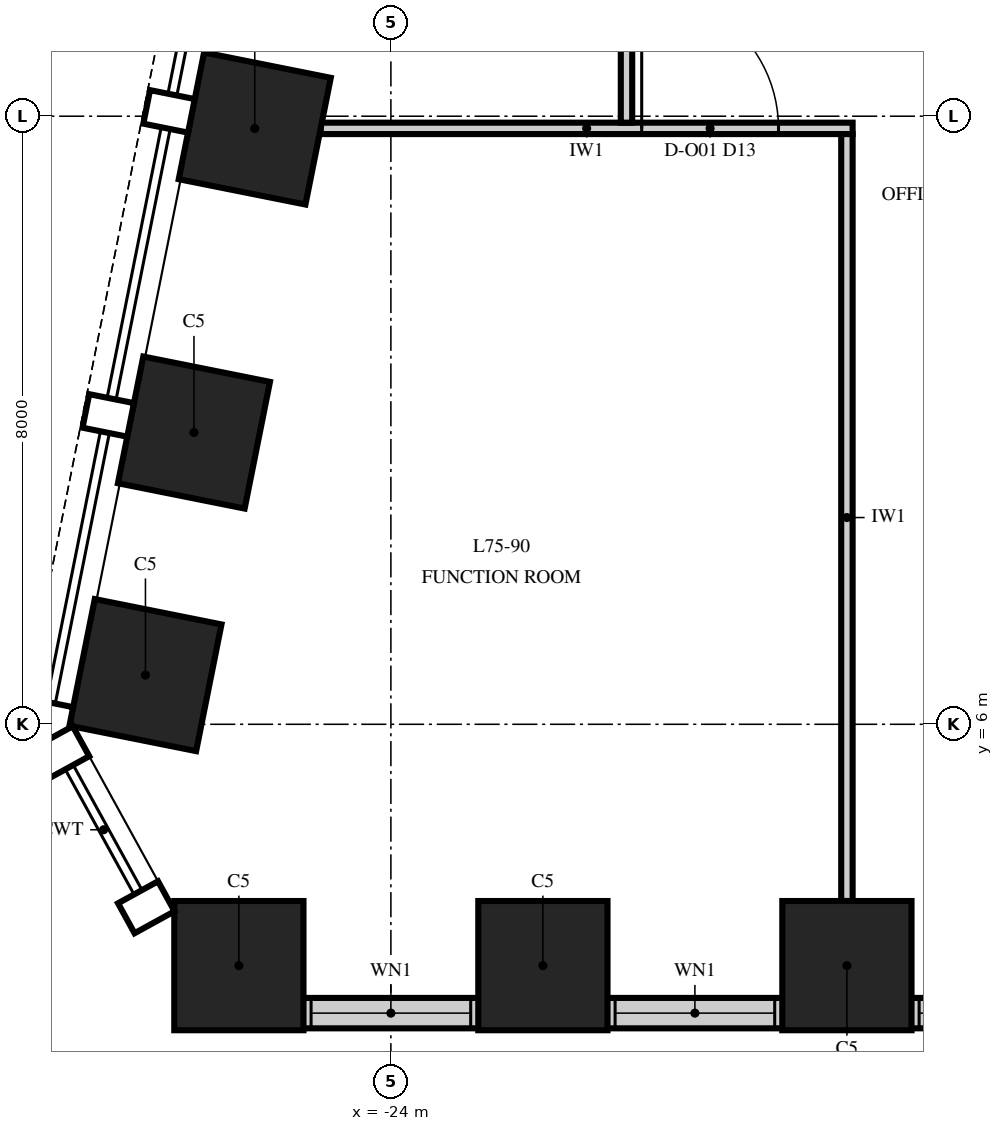
"""IFC4 building model, lengths in metres.
Left out: names, types, materials, properties, quantities, classifications, styles, units other than length and angle.
Written with IfcOpenShell. Run it as: python <this file> out.ifc"""

import sys

from ifc_helpers import new_model, si_unit, direction, frame, frame_2d, origin, origin_2d, place, context, subcontext, project, spatial, rectangle, extrude, element, fill, save


model = new_model("IFC4")
c1 = context("Model", 3, precision=1e-05, world=origin(), true_north=direction((0.0, 1.0)))
c2 = subcontext(c1, "Body", "Model", "MODEL_VIEW")
j1 = project(units=[si_unit("LENGTHUNIT", "METRE"), si_unit("PLANEANGLEUNIT", "RADIAN")], contexts=[c1])
p1 = place(None, origin())
s1 = spatial("IfcSite", under=j1, at=p1, CompositionType="ELEMENT")
p2 = place(p1, origin())
s2 = spatial("IfcBuilding", under=s1, at=p2, CompositionType="ELEMENT")
p3 = place(p2, frame((0.0, 0.0, 320.0)))
s3 = spatial("IfcBuildingStorey", under=s2, at=p3, CompositionType="ELEMENT", Elevation=320.0)
for number, where, z_axis, x_axis in (
    (1, (-26.0, 2.825, 0.0), (0.0, 0.0, 1.0), (1.0, 0.0, 0.0)),
    (2, (-22.0, 2.825, 0.0), (0.0, 0.0, 1.0), (1.0, 0.0, 0.0)),
    (3, (-18.0, 2.825, 0.0), (0.0, 0.0, 1.0), (1.0, 0.0, 0.0)),
    (4, (-25.791, 13.838, 0.0), (0.0, 0.0, 1.0), (-0.196, -0.981, 0.0)),
    (5, (-26.591, 9.838, 0.0), (0.0, 0.0, 1.0), (-0.196, -0.981, 0.0)),
    (6, (-27.229, 6.647, 0.0), (0.0, 0.0, 1.0), (-0.196, -0.981, 0.0)),
):
    element("IfcColumn", number, at=place(p3, frame(where, z_axis=z_axis, x_axis=x_axis)), inside=s3, PredefinedType="COLUMN", context=c2, shape_type="SweptSolid", body=[
        extrude(rectangle(XDim=1.7, YDim=1.7, at=origin_2d()), origin(), (0.0, 0.0, 1.0), 4.0),
    ])
p4 = place(p3, frame((-26.0, 2.2, 0.0), z_axis=(0.0, 0.0, 1.0), x_axis=(1.0, 0.0, 0.0)))
e7 = element("IfcWall", 7, at=p4, inside=s3, PredefinedType="SOLIDWALL", context=c2, shape_type="SweptSolid", body=[
    extrude(rectangle(XDim=52.0, YDim=0.4, at=frame_2d((26.0, 0.0))), origin(), (0.0, 0.0, 1.0), 2.0),
])
p5 = place(p4, frame((0.95, 0.0, 0.8)))
e8 = element("IfcOpeningElement", 8, at=p5, cuts=e7, PredefinedType="OPENING", context=c2, shape_type="SweptSolid", body=[
    extrude(rectangle(XDim=2.1, YDim=1.15, at=frame_2d((1.05, 0.575))), frame((0.0, 0.215, 0.0), z_axis=(0.0, -1.0, 0.0), x_axis=(1.0, 0.0, 0.0)), (0.0, 0.0, 1.0), 0.43),
])
p6 = place(p4, frame((4.95, 0.0, 0.8)))
e9 = element("IfcOpeningElement", 9, at=p6, cuts=e7, PredefinedType="OPENING", context=c2, shape_type="SweptSolid", body=[
    extrude(rectangle(XDim=2.1, YDim=1.15, at=frame_2d((1.05, 0.575))), frame((0.0, 0.215, 0.0), z_axis=(0.0, -1.0, 0.0), x_axis=(1.0, 0.0, 0.0)), (0.0, 0.0, 1.0), 0.43),
])
p7 = place(p4, frame((8.95, 0.0, 0.8)))
e10 = element("IfcOpeningElement", 10, at=p7, cuts=e7, PredefinedType="OPENING", context=c2, shape_type="SweptSolid", body=[
    extrude(rectangle(XDim=2.1, YDim=1.15, at=frame_2d((1.05, 0.575))), frame((0.0, 0.215, 0.0), z_axis=(0.0, -1.0, 0.0), x_axis=(1.0, 0.0, 0.0)), (0.0, 0.0, 1.0), 0.43),
])
p8 = place(p4, frame((12.95, 0.0, 0.8)))
e11 = element("IfcOpeningElement", 11, at=p8, cuts=e7, PredefinedType="OPENING", context=c2, shape_type="SweptSolid", body=[
    extrude(rectangle(XDim=2.1, YDim=1.15, at=frame_2d((1.05, 0.575))), frame((0.0, 0.215, 0.0), z_axis=(0.0, -1.0, 0.0), x_axis=(1.0, 0.0, 0.0)), (0.0, 0.0, 1.0), 0.43),
])
p9 = place(p4, frame((16.95, 0.0, 0.8)))
e12 = element("IfcOpeningElement", 12, at=p9, cuts=e7, PredefinedType="OPENING", context=c2, shape_type="SweptSolid", body=[
    extrude(rectangle(XDim=2.1, YDim=1.15, at=frame_2d((1.05, 0.575))), frame((0.0, 0.215, 0.0), z_axis=(0.0, -1.0, 0.0), x_axis=(1.0, 0.0, 0.0)), (0.0, 0.0, 1.0), 0.43),
])
p10 = place(p4, frame((20.95, 0.0, 0.8)))
e13 = element("IfcOpeningElement", 13, at=p10, cuts=e7, PredefinedType="OPENING", context=c2, shape_type="SweptSolid", body=[
    extrude(rectangle(XDim=2.1, YDim=1.15, at=frame_2d((1.05, 0.575))), frame((0.0, 0.215, 0.0), z_axis=(0.0, -1.0, 0.0), x_axis=(1.0, 0.0, 0.0)), (0.0, 0.0, 1.0), 0.43),
])
p11 = place(p4, frame((24.95, 0.0, 0.8)))
e14 = element("IfcOpeningElement", 14, at=p11, cuts=e7, PredefinedType="OPENING", context=c2, shape_type="SweptSolid", body=[
    extrude(rectangle(XDim=2.1, YDim=1.15, at=frame_2d((1.05, 0.575))), frame((0.0, 0.215, 0.0), z_axis=(0.0, -1.0, 0.0), x_axis=(1.0, 0.0, 0.0)), (0.0, 0.0, 1.0), 0.43),
])
p12 = place(p4, frame((28.95, 0.0, 0.8)))
e15 = element("IfcOpeningElement", 15, at=p12, cuts=e7, PredefinedType="OPENING", context=c2, shape_type="SweptSolid", body=[
    extrude(rectangle(XDim=2.1, YDim=1.15, at=frame_2d((1.05, 0.575))), frame((0.0, 0.215, 0.0), z_axis=(0.0, -1.0, 0.0), x_axis=(1.0, 0.0, 0.0)), (0.0, 0.0, 1.0), 0.43),
])
p13 = place(p4, frame((32.95, 0.0, 0.8)))
e16 = element("IfcOpeningElement", 16, at=p13, cuts=e7, PredefinedType="OPENING", context=c2, shape_type="SweptSolid", body=[
    extrude(rectangle(XDim=2.1, YDim=1.15, at=frame_2d((1.05, 0.575))), frame((0.0, 0.215, 0.0), z_axis=(0.0, -1.0, 0.0), x_axis=(1.0, 0.0, 0.0)), (0.0, 0.0, 1.0), 0.43),
])
p14 = place(p4, frame((36.95, 0.0, 0.8)))
e17 = element("IfcOpeningElement", 17, at=p14, cuts=e7, PredefinedType="OPENING", context=c2, shape_type="SweptSolid", body=[
    extrude(rectangle(XDim=2.1, YDim=1.15, at=frame_2d((1.05, 0.575))), frame((0.0, 0.215, 0.0), z_axis=(0.0, -1.0, 0.0), x_axis=(1.0, 0.0, 0.0)), (0.0, 0.0, 1.0), 0.43),
])
p15 = place(p4, frame((40.95, 0.0, 0.8)))
e18 = element("IfcOpeningElement", 18, at=p15, cuts=e7, PredefinedType="OPENING", context=c2, shape_type="SweptSolid", body=[
    extrude(rectangle(XDim=2.1, YDim=1.15, at=frame_2d((1.05, 0.575))), frame((0.0, 0.215, 0.0), z_axis=(0.0, -1.0, 0.0), x_axis=(1.0, 0.0, 0.0)), (0.0, 0.0, 1.0), 0.43),
])
p16 = place(p4, frame((44.95, 0.0, 0.8)))
e19 = element("IfcOpeningElement", 19, at=p16, cuts=e7, PredefinedType="OPENING", context=c2, shape_type="SweptSolid", body=[
    extrude(rectangle(XDim=2.1, YDim=1.15, at=frame_2d((1.05, 0.575))), frame((0.0, 0.215, 0.0), z_axis=(0.0, -1.0, 0.0), x_axis=(1.0, 0.0, 0.0)), (0.0, 0.0, 1.0), 0.43),
])
p17 = place(p4, frame((48.95, 0.0, 0.8)))
e20 = element("IfcOpeningElement", 20, at=p17, cuts=e7, PredefinedType="OPENING", context=c2, shape_type="SweptSolid", body=[
    extrude(rectangle(XDim=2.1, YDim=1.15, at=frame_2d((1.05, 0.575))), frame((0.0, 0.215, 0.0), z_axis=(0.0, -1.0, 0.0), x_axis=(1.0, 0.0, 0.0)), (0.0, 0.0, 1.0), 0.43),
])
p18 = place(p3, frame((-24.924, 13.84, 0.0), z_axis=(0.0, 0.0, 1.0), x_axis=(1.0, 0.0, 0.0)))
e21 = element("IfcWall", 21, at=p18, inside=s3, PredefinedType="PARTITIONING", context=c2, shape_type="SweptSolid", body=[
    extrude(rectangle(XDim=6.999, YDim=0.15, at=frame_2d((3.5, 0.0))), origin(), (0.0, 0.0, 1.0), 3.13),
])
p19 = place(p18, frame((4.224, 0.0, 0.0)))
e22 = element("IfcOpeningElement", 22, at=p19, cuts=e21, PredefinedType="OPENING", context=c2, shape_type="SweptSolid", body=[
    extrude(rectangle(XDim=1.8, YDim=2.4, at=frame_2d((0.9, 1.2))), frame((0.0, 0.09, 0.0), z_axis=(0.0, -1.0, 0.0), x_axis=(1.0, 0.0, 0.0)), (0.0, 0.0, 1.0), 0.18),
])
p20 = place(p3, frame((-20.9, 13.915, 0.0), z_axis=(0.0, 0.0, 1.0), x_axis=(0.0, 1.0, 0.0)))
e23 = element("IfcWall", 23, at=p20, inside=s3, PredefinedType="PARTITIONING", context=c2, shape_type="SweptSolid", body=[
    extrude(rectangle(XDim=3.85, YDim=0.15, at=frame_2d((1.925, 0.0))), origin(), (0.0, 0.0, 1.0), 3.13),
])
p21 = place(p20, frame((1.425, 0.0, 0.0)))
e24 = element("IfcOpeningElement", 24, at=p21, cuts=e23, PredefinedType="OPENING", context=c2, shape_type="SweptSolid", body=[
    extrude(rectangle(XDim=1.0, YDim=2.3, at=frame_2d((0.5, 1.15))), frame((0.0, 0.09, 0.0), z_axis=(0.0, -1.0, 0.0), x_axis=(1.0, 0.0, 0.0)), (0.0, 0.0, 1.0), 0.18),
])
p22 = place(p3, frame((-18.0, 3.675, 0.0), z_axis=(0.0, 0.0, 1.0), x_axis=(0.0, 1.0, 0.0)))
e25 = element("IfcWall", 25, at=p22, inside=s3, PredefinedType="PARTITIONING", context=c2, shape_type="SweptSolid", body=[
    extrude(rectangle(XDim=10.09, YDim=0.15, at=frame_2d((5.045, 0.0))), origin(), (0.0, 0.0, 1.0), 2.742),
])
p23 = place(p5, origin())
e26 = element("IfcWindow", 26, at=p23, inside=s3, PartitioningType="SINGLE_PANEL", PredefinedType="WINDOW", context=c2, shape_type="SweptSolid", body=[
    extrude(rectangle(XDim=2.1, YDim=1.15, at=frame_2d((1.05, 0.575))), frame((0.0, 0.03, 0.0), z_axis=(0.0, -1.0, 0.0), x_axis=(1.0, 0.0, 0.0)), (0.0, 0.0, 1.0), 0.06),
])
fill(e8, e26)
p24 = place(p6, origin())
e27 = element("IfcWindow", 27, at=p24, inside=s3, PartitioningType="SINGLE_PANEL", PredefinedType="WINDOW", context=c2, shape_type="SweptSolid", body=[
    extrude(rectangle(XDim=2.1, YDim=1.15, at=frame_2d((1.05, 0.575))), frame((0.0, 0.03, 0.0), z_axis=(0.0, -1.0, 0.0), x_axis=(1.0, 0.0, 0.0)), (0.0, 0.0, 1.0), 0.06),
])
fill(e9, e27)
p25 = place(p7, origin())
e28 = element("IfcWindow", 28, at=p25, inside=s3, PartitioningType="SINGLE_PANEL", PredefinedType="WINDOW", context=c2, shape_type="SweptSolid", body=[
    extrude(rectangle(XDim=2.1, YDim=1.15, at=frame_2d((1.05, 0.575))), frame((0.0, 0.03, 0.0), z_axis=(0.0, -1.0, 0.0), x_axis=(1.0, 0.0, 0.0)), (0.0, 0.0, 1.0), 0.06),
])
fill(e10, e28)
p26 = place(p19, origin())
e29 = element("IfcDoor", 29, at=p26, inside=s3, OperationType="DOUBLE_DOOR_SINGLE_SWING", PredefinedType="DOOR", context=c2, shape_type="SweptSolid", body=[
    extrude(rectangle(XDim=1.8, YDim=2.4, at=frame_2d((0.9, 1.2))), frame((0.0, 0.075, 0.0), z_axis=(0.0, -1.0, 0.0), x_axis=(1.0, 0.0, 0.0)), (0.0, 0.0, 1.0), 0.149),
])
fill(e22, e29)
save(model, sys.argv[1])
